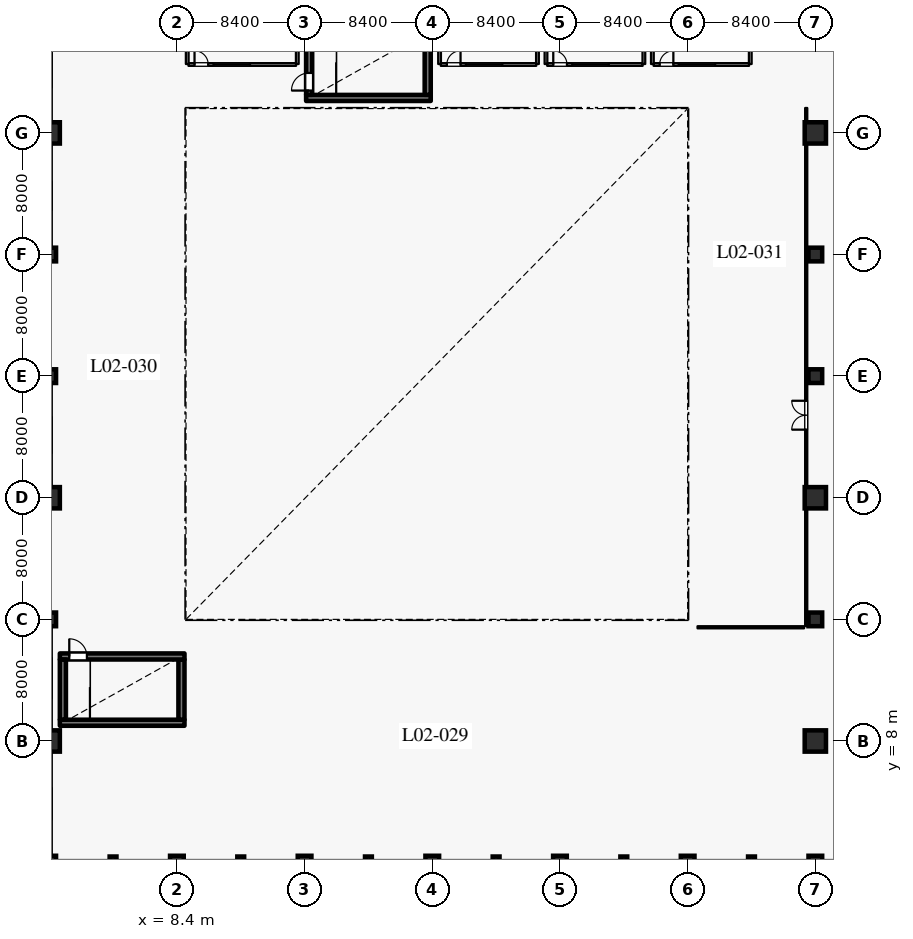
"""IFC4 building model, lengths in metres.
Left out: names, types, materials, properties, quantities, classifications, styles, units other than length and angle.
Written with IfcOpenShell. Run it as: python <this file> out.ifc"""

import sys

from ifc_helpers import new_model, si_unit, direction, frame, frame_2d, origin, origin_with_axes, origin_2d, place, context, subcontext, project, spatial, rectangle, circle, extrude, element, fill, save


model = new_model("IFC4")
c1 = context("Model", 3, precision=1e-05, world=origin(), true_north=direction((0.0, 1.0)))
c2 = subcontext(c1, "Body", "Model", "MODEL_VIEW")
j1 = project(units=[si_unit("LENGTHUNIT", "METRE"), si_unit("PLANEANGLEUNIT", "RADIAN")], contexts=[c1])
p1 = place(None, origin())
s1 = spatial("IfcSite", under=j1, at=p1, CompositionType="ELEMENT")
p2 = place(p1, origin())
s2 = spatial("IfcBuilding", under=s1, at=p2, CompositionType="ELEMENT")
p3 = place(p2, frame((0.0, 0.0, 11.4)))
s3 = spatial("IfcBuildingStorey", under=s2, at=p3, CompositionType="ELEMENT", Elevation=11.4)
p4 = place(p3, origin_with_axes())
e1 = element("IfcColumn", 1, at=p4, inside=s3, PredefinedType="COLUMN", context=c2, shape_type="SweptSolid", body=[
    extrude(rectangle(XDim=0.9, YDim=0.9, at=origin_2d()), origin(), (0.0, 0.0, 1.0), 4.8),
])
p5 = place(p3, frame((0.0, 8.0, 0.0), z_axis=(0.0, 0.0, 1.0), x_axis=(1.0, 0.0, 0.0)))
e2 = element("IfcColumn", 2, at=p5, inside=s3, PredefinedType="COLUMN", context=c2, shape_type="SweptSolid", body=[
    extrude(circle(Radius=0.7, at=origin_2d()), origin(), (0.0, 0.0, 1.0), 4.8),
])
p6 = place(p3, frame((0.0, 16.0, 0.0), z_axis=(0.0, 0.0, 1.0), x_axis=(1.0, 0.0, 0.0)))
e3 = element("IfcColumn", 3, at=p6, inside=s3, PredefinedType="COLUMN", context=c2, shape_type="SweptSolid", body=[
    extrude(rectangle(XDim=0.9, YDim=0.9, at=origin_2d()), origin(), (0.0, 0.0, 1.0), 4.8),
])
p7 = place(p3, frame((0.0, 24.0, 0.0), z_axis=(0.0, 0.0, 1.0), x_axis=(1.0, 0.0, 0.0)))
e4 = element("IfcColumn", 4, at=p7, inside=s3, PredefinedType="COLUMN", context=c2, shape_type="SweptSolid", body=[
    extrude(circle(Radius=0.7, at=origin_2d()), origin(), (0.0, 0.0, 1.0), 4.8),
])
for number, where, z_axis, x_axis in (
    (5, (0.0, 32.0, 0.0), (0.0, 0.0, 1.0), (1.0, 0.0, 0.0)),
    (6, (0.0, 40.0, 0.0), (0.0, 0.0, 1.0), (1.0, 0.0, 0.0)),
):
    element("IfcColumn", number, at=place(p3, frame(where, z_axis=z_axis, x_axis=x_axis)), inside=s3, PredefinedType="COLUMN", context=c2, shape_type="SweptSolid", body=[
        extrude(rectangle(XDim=0.9, YDim=0.9, at=origin_2d()), origin(), (0.0, 0.0, 1.0), 4.8),
    ])
p8 = place(p3, frame((0.0, 48.0, 0.0), z_axis=(0.0, 0.0, 1.0), x_axis=(1.0, 0.0, 0.0)))
e7 = element("IfcColumn", 7, at=p8, inside=s3, PredefinedType="COLUMN", context=c2, shape_type="SweptSolid", body=[
    extrude(circle(Radius=0.7, at=origin_2d()), origin(), (0.0, 0.0, 1.0), 4.8),
])
p9 = place(p3, frame((4.2, 0.0, 0.0), z_axis=(0.0, 0.0, 1.0), x_axis=(1.0, 0.0, 0.0)))
e8 = element("IfcColumn", 8, at=p9, inside=s3, PredefinedType="PILASTER", context=c2, shape_type="SweptSolid", body=[
    extrude(rectangle(XDim=0.45, YDim=0.8, at=origin_2d()), origin(), (0.0, 0.0, 1.0), 4.8),
])
p10 = place(p3, frame((8.4, 0.0, 0.0), z_axis=(0.0, 0.0, 1.0), x_axis=(1.0, 0.0, 0.0)))
e9 = element("IfcColumn", 9, at=p10, inside=s3, PredefinedType="COLUMN", context=c2, shape_type="SweptSolid", body=[
    extrude(rectangle(XDim=0.9, YDim=0.9, at=origin_2d()), origin(), (0.0, 0.0, 1.0), 4.8),
])
p11 = place(p3, frame((12.6, 0.0, 0.0), z_axis=(0.0, 0.0, 1.0), x_axis=(1.0, 0.0, 0.0)))
e10 = element("IfcColumn", 10, at=p11, inside=s3, PredefinedType="PILASTER", context=c2, shape_type="SweptSolid", body=[
    extrude(rectangle(XDim=0.45, YDim=0.8, at=origin_2d()), origin(), (0.0, 0.0, 1.0), 4.8),
])
p12 = place(p3, frame((16.8, 0.0, 0.0), z_axis=(0.0, 0.0, 1.0), x_axis=(1.0, 0.0, 0.0)))
e11 = element("IfcColumn", 11, at=p12, inside=s3, PredefinedType="COLUMN", context=c2, shape_type="SweptSolid", body=[
    extrude(rectangle(XDim=0.9, YDim=0.9, at=origin_2d()), origin(), (0.0, 0.0, 1.0), 4.8),
])
p13 = place(p3, frame((21.0, 0.0, 0.0), z_axis=(0.0, 0.0, 1.0), x_axis=(1.0, 0.0, 0.0)))
e12 = element("IfcColumn", 12, at=p13, inside=s3, PredefinedType="PILASTER", context=c2, shape_type="SweptSolid", body=[
    extrude(rectangle(XDim=0.45, YDim=0.8, at=origin_2d()), origin(), (0.0, 0.0, 1.0), 4.8),
])
p14 = place(p3, frame((25.2, 0.0, 0.0), z_axis=(0.0, 0.0, 1.0), x_axis=(1.0, 0.0, 0.0)))
e13 = element("IfcColumn", 13, at=p14, inside=s3, PredefinedType="COLUMN", context=c2, shape_type="SweptSolid", body=[
    extrude(rectangle(XDim=0.9, YDim=0.9, at=origin_2d()), origin(), (0.0, 0.0, 1.0), 4.8),
])
p15 = place(p3, frame((29.4, 0.0, 0.0), z_axis=(0.0, 0.0, 1.0), x_axis=(1.0, 0.0, 0.0)))
e14 = element("IfcColumn", 14, at=p15, inside=s3, PredefinedType="PILASTER", context=c2, shape_type="SweptSolid", body=[
    extrude(rectangle(XDim=0.45, YDim=0.8, at=origin_2d()), origin(), (0.0, 0.0, 1.0), 4.8),
])
p16 = place(p3, frame((33.6, 0.0, 0.0), z_axis=(0.0, 0.0, 1.0), x_axis=(1.0, 0.0, 0.0)))
e15 = element("IfcColumn", 15, at=p16, inside=s3, PredefinedType="COLUMN", context=c2, shape_type="SweptSolid", body=[
    extrude(rectangle(XDim=0.9, YDim=0.9, at=origin_2d()), origin(), (0.0, 0.0, 1.0), 4.8),
])
p17 = place(p3, frame((37.8, 0.0, 0.0), z_axis=(0.0, 0.0, 1.0), x_axis=(1.0, 0.0, 0.0)))
e16 = element("IfcColumn", 16, at=p17, inside=s3, PredefinedType="PILASTER", context=c2, shape_type="SweptSolid", body=[
    extrude(rectangle(XDim=0.45, YDim=0.8, at=origin_2d()), origin(), (0.0, 0.0, 1.0), 4.8),
])
p18 = place(p3, frame((42.0, 0.0, 0.0), z_axis=(0.0, 0.0, 1.0), x_axis=(1.0, 0.0, 0.0)))
e17 = element("IfcColumn", 17, at=p18, inside=s3, PredefinedType="COLUMN", context=c2, shape_type="SweptSolid", body=[
    extrude(rectangle(XDim=0.9, YDim=0.9, at=origin_2d()), origin(), (0.0, 0.0, 1.0), 4.8),
])
p19 = place(p3, frame((46.2, 0.0, 0.0), z_axis=(0.0, 0.0, 1.0), x_axis=(1.0, 0.0, 0.0)))
e18 = element("IfcColumn", 18, at=p19, inside=s3, PredefinedType="PILASTER", context=c2, shape_type="SweptSolid", body=[
    extrude(rectangle(XDim=0.45, YDim=0.8, at=origin_2d()), origin(), (0.0, 0.0, 1.0), 4.8),
])
p20 = place(p3, frame((50.4, 0.0, 0.0), z_axis=(0.0, 0.0, 1.0), x_axis=(1.0, 0.0, 0.0)))
e19 = element("IfcColumn", 19, at=p20, inside=s3, PredefinedType="COLUMN", context=c2, shape_type="SweptSolid", body=[
    extrude(rectangle(XDim=0.9, YDim=0.9, at=origin_2d()), origin(), (0.0, 0.0, 1.0), 4.8),
])
p21 = place(p3, frame((50.4, 8.0, 0.0), z_axis=(0.0, 0.0, 1.0), x_axis=(1.0, 0.0, 0.0)))
e20 = element("IfcColumn", 20, at=p21, inside=s3, PredefinedType="COLUMN", context=c2, shape_type="SweptSolid", body=[
    extrude(circle(Radius=0.7, at=origin_2d()), origin(), (0.0, 0.0, 1.0), 4.8),
])
p22 = place(p3, frame((50.4, 16.0, 0.0), z_axis=(0.0, 0.0, 1.0), x_axis=(1.0, 0.0, 0.0)))
e21 = element("IfcColumn", 21, at=p22, inside=s3, PredefinedType="COLUMN", context=c2, shape_type="SweptSolid", body=[
    extrude(rectangle(XDim=0.9, YDim=0.9, at=origin_2d()), origin(), (0.0, 0.0, 1.0), 4.8),
])
p23 = place(p3, frame((50.4, 24.0, 0.0), z_axis=(0.0, 0.0, 1.0), x_axis=(1.0, 0.0, 0.0)))
e22 = element("IfcColumn", 22, at=p23, inside=s3, PredefinedType="COLUMN", context=c2, shape_type="SweptSolid", body=[
    extrude(circle(Radius=0.7, at=origin_2d()), origin(), (0.0, 0.0, 1.0), 4.8),
])
for number, where, z_axis, x_axis in (
    (23, (50.4, 32.0, 0.0), (0.0, 0.0, 1.0), (1.0, 0.0, 0.0)),
    (24, (50.4, 40.0, 0.0), (0.0, 0.0, 1.0), (1.0, 0.0, 0.0)),
):
    element("IfcColumn", number, at=place(p3, frame(where, z_axis=z_axis, x_axis=x_axis)), inside=s3, PredefinedType="COLUMN", context=c2, shape_type="SweptSolid", body=[
        extrude(rectangle(XDim=0.9, YDim=0.9, at=origin_2d()), origin(), (0.0, 0.0, 1.0), 4.8),
    ])
p24 = place(p3, frame((50.4, 48.0, 0.0), z_axis=(0.0, 0.0, 1.0), x_axis=(1.0, 0.0, 0.0)))
e25 = element("IfcColumn", 25, at=p24, inside=s3, PredefinedType="COLUMN", context=c2, shape_type="SweptSolid", body=[
    extrude(circle(Radius=0.7, at=origin_2d()), origin(), (0.0, 0.0, 1.0), 4.8),
])
p25 = place(p3, frame((0.7, 9.2, 0.0), z_axis=(0.0, 0.0, 1.0), x_axis=(1.0, 0.0, 0.0)))
e26 = element("IfcWall", 26, at=p25, inside=s3, PredefinedType="SHEAR", context=c2, shape_type="SweptSolid", body=[
    extrude(rectangle(XDim=8.2, YDim=0.4, at=frame_2d((4.1, 0.0))), origin(), (0.0, 0.0, 1.0), 4.535),
])
p26 = place(p3, frame((8.7, 9.405, 0.0), z_axis=(0.0, 0.0, 1.0), x_axis=(0.0, 1.0, 0.0)))
e27 = element("IfcWall", 27, at=p26, inside=s3, PredefinedType="SHEAR", context=c2, shape_type="SweptSolid", body=[
    extrude(rectangle(XDim=3.95, YDim=0.4, at=frame_2d((1.975, 0.0))), origin(), (0.0, 0.0, 1.0), 4.535),
])
p27 = place(p3, frame((0.7, 13.56, 0.0), z_axis=(0.0, 0.0, 1.0), x_axis=(1.0, 0.0, 0.0)))
e28 = element("IfcWall", 28, at=p27, inside=s3, PredefinedType="SHEAR", context=c2, shape_type="SweptSolid", body=[
    extrude(rectangle(XDim=8.2, YDim=0.4, at=frame_2d((4.1, 0.0))), origin(), (0.0, 0.0, 1.0), 4.535),
])
p28 = place(p27, frame((0.62, 0.0, 0.0)))
e29 = element("IfcOpeningElement", 29, at=p28, cuts=e28, PredefinedType="OPENING", context=c2, shape_type="SweptSolid", body=[
    extrude(rectangle(XDim=1.16, YDim=2.2, at=frame_2d((0.58, 1.1))), frame((0.0, 0.21, 0.0), z_axis=(0.0, -1.0, 0.0), x_axis=(1.0, 0.0, 0.0)), (0.0, 0.0, 1.0), 0.42),
])
p29 = place(p3, frame((0.9, 9.405, 0.0), z_axis=(0.0, 0.0, 1.0), x_axis=(0.0, 1.0, 0.0)))
e30 = element("IfcWall", 30, at=p29, inside=s3, PredefinedType="SHEAR", context=c2, shape_type="SweptSolid", body=[
    extrude(rectangle(XDim=3.95, YDim=0.4, at=frame_2d((1.975, 0.0))), origin(), (0.0, 0.0, 1.0), 4.535),
])
p30 = place(p3, frame((16.9, 50.3, 0.0), z_axis=(0.0, 0.0, 1.0), x_axis=(1.0, 0.0, 0.0)))
e31 = element("IfcWall", 31, at=p30, inside=s3, PredefinedType="SHEAR", context=c2, shape_type="SweptSolid", body=[
    extrude(rectangle(XDim=8.2, YDim=0.4, at=frame_2d((4.1, 0.0))), origin(), (0.0, 0.0, 1.0), 4.535),
])
p31 = place(p3, frame((24.9, 50.505, 0.0), z_axis=(0.0, 0.0, 1.0), x_axis=(0.0, 1.0, 0.0)))
e32 = element("IfcWall", 32, at=p31, inside=s3, PredefinedType="SHEAR", context=c2, shape_type="SweptSolid", body=[
    extrude(rectangle(XDim=3.95, YDim=0.4, at=frame_2d((1.975, 0.0))), origin(), (0.0, 0.0, 1.0), 4.535),
])
p32 = place(p3, frame((17.1, 50.505, 0.0), z_axis=(0.0, 0.0, 1.0), x_axis=(0.0, 1.0, 0.0)))
e33 = element("IfcWall", 33, at=p32, inside=s3, PredefinedType="SHEAR", context=c2, shape_type="SweptSolid", body=[
    extrude(rectangle(XDim=3.95, YDim=0.4, at=frame_2d((1.975, 0.0))), origin(), (0.0, 0.0, 1.0), 4.535),
])
p33 = place(p32, frame((0.28, 0.0, 0.0)))
e34 = element("IfcOpeningElement", 34, at=p33, cuts=e33, PredefinedType="OPENING", context=c2, shape_type="SweptSolid", body=[
    extrude(rectangle(XDim=1.16, YDim=2.2, at=frame_2d((0.58, 1.1))), frame((0.0, 0.21, 0.0), z_axis=(0.0, -1.0, 0.0), x_axis=(1.0, 0.0, 0.0)), (0.0, 0.0, 1.0), 0.42),
])
p34 = place(p3, frame((49.8, 15.56, 0.0), z_axis=(0.0, 0.0, 1.0), x_axis=(0.0, 1.0, 0.0)))
e35 = element("IfcWall", 35, at=p34, inside=s3, PredefinedType="PARTITIONING", context=c2, shape_type="SweptSolid", body=[
    extrude(rectangle(XDim=34.08, YDim=0.14, at=frame_2d((17.04, 0.0))), origin(), (0.0, 0.0, 1.0), 4.535),
])
p35 = place(p34, frame((12.92, 0.0, 0.0)))
e36 = element("IfcOpeningElement", 36, at=p35, cuts=e35, PredefinedType="OPENING", context=c2, shape_type="SweptSolid", body=[
    extrude(rectangle(XDim=1.9, YDim=2.4, at=frame_2d((0.95, 1.2))), frame((0.0, 0.08, 0.0), z_axis=(0.0, -1.0, 0.0), x_axis=(1.0, 0.0, 0.0)), (0.0, 0.0, 1.0), 0.16),
])
p36 = place(p3, frame((42.65, 15.48, 0.0), z_axis=(0.0, 0.0, 1.0), x_axis=(1.0, 0.0, 0.0)))
e37 = element("IfcWall", 37, at=p36, inside=s3, PredefinedType="PARTITIONING", context=c2, shape_type="SweptSolid", body=[
    extrude(rectangle(XDim=7.01, YDim=0.14, at=frame_2d((3.505, 0.0))), origin(), (0.0, 0.0, 1.0), 4.535),
])
p37 = place(p3, frame((9.16, 52.5, 0.0), z_axis=(0.0, 0.0, 1.0), x_axis=(1.0, 0.0, 0.0)))
e38 = element("IfcWall", 38, at=p37, inside=s3, PredefinedType="PARTITIONING", context=c2, shape_type="SweptSolid", body=[
    extrude(rectangle(XDim=7.08, YDim=0.18, at=frame_2d((3.54, 0.0))), origin(), (0.0, 0.0, 1.0), 4.535),
])
p38 = place(p37, frame((0.4, 0.0, 0.0)))
e39 = element("IfcOpeningElement", 39, at=p38, cuts=e38, PredefinedType="OPENING", context=c2, shape_type="SweptSolid", body=[
    extrude(rectangle(XDim=0.9, YDim=2.1, at=frame_2d((0.45, 1.05))), frame((0.0, 0.1, 0.0), z_axis=(0.0, -1.0, 0.0), x_axis=(1.0, 0.0, 0.0)), (0.0, 0.0, 1.0), 0.2),
])
p39 = place(p37, frame((1.65, 0.0, 0.9)))
e40 = element("IfcOpeningElement", 40, at=p39, cuts=e38, PredefinedType="OPENING", context=c2, shape_type="SweptSolid", body=[
    extrude(rectangle(XDim=2.4, YDim=1.3, at=frame_2d((1.2, 0.65))), frame((0.0, 0.1, 0.0), z_axis=(0.0, -1.0, 0.0), x_axis=(1.0, 0.0, 0.0)), (0.0, 0.0, 1.0), 0.2),
])
p40 = place(p3, frame((25.76, 52.5, 0.0), z_axis=(0.0, 0.0, 1.0), x_axis=(1.0, 0.0, 0.0)))
e41 = element("IfcWall", 41, at=p40, inside=s3, PredefinedType="PARTITIONING", context=c2, shape_type="SweptSolid", body=[
    extrude(rectangle(XDim=6.28, YDim=0.18, at=frame_2d((3.14, 0.0))), origin(), (0.0, 0.0, 1.0), 4.535),
])
p41 = place(p40, frame((0.4, 0.0, 0.0)))
e42 = element("IfcOpeningElement", 42, at=p41, cuts=e41, PredefinedType="OPENING", context=c2, shape_type="SweptSolid", body=[
    extrude(rectangle(XDim=0.9, YDim=2.1, at=frame_2d((0.45, 1.05))), frame((0.0, 0.1, 0.0), z_axis=(0.0, -1.0, 0.0), x_axis=(1.0, 0.0, 0.0)), (0.0, 0.0, 1.0), 0.2),
])
p42 = place(p40, frame((1.65, 0.0, 0.9)))
e43 = element("IfcOpeningElement", 43, at=p42, cuts=e41, PredefinedType="OPENING", context=c2, shape_type="SweptSolid", body=[
    extrude(rectangle(XDim=2.4, YDim=1.3, at=frame_2d((1.2, 0.65))), frame((0.0, 0.1, 0.0), z_axis=(0.0, -1.0, 0.0), x_axis=(1.0, 0.0, 0.0)), (0.0, 0.0, 1.0), 0.2),
])
p43 = place(p3, frame((32.76, 52.5, 0.0), z_axis=(0.0, 0.0, 1.0), x_axis=(1.0, 0.0, 0.0)))
e44 = element("IfcWall", 44, at=p43, inside=s3, PredefinedType="PARTITIONING", context=c2, shape_type="SweptSolid", body=[
    extrude(rectangle(XDim=6.28, YDim=0.18, at=frame_2d((3.14, 0.0))), origin(), (0.0, 0.0, 1.0), 4.535),
])
p44 = place(p43, frame((0.4, 0.0, 0.0)))
e45 = element("IfcOpeningElement", 45, at=p44, cuts=e44, PredefinedType="OPENING", context=c2, shape_type="SweptSolid", body=[
    extrude(rectangle(XDim=0.9, YDim=2.1, at=frame_2d((0.45, 1.05))), frame((0.0, 0.1, 0.0), z_axis=(0.0, -1.0, 0.0), x_axis=(1.0, 0.0, 0.0)), (0.0, 0.0, 1.0), 0.2),
])
p45 = place(p43, frame((1.65, 0.0, 0.9)))
e46 = element("IfcOpeningElement", 46, at=p45, cuts=e44, PredefinedType="OPENING", context=c2, shape_type="SweptSolid", body=[
    extrude(rectangle(XDim=2.4, YDim=1.3, at=frame_2d((1.2, 0.65))), frame((0.0, 0.1, 0.0), z_axis=(0.0, -1.0, 0.0), x_axis=(1.0, 0.0, 0.0)), (0.0, 0.0, 1.0), 0.2),
])
p46 = place(p3, frame((39.76, 52.5, 0.0), z_axis=(0.0, 0.0, 1.0), x_axis=(1.0, 0.0, 0.0)))
e47 = element("IfcWall", 47, at=p46, inside=s3, PredefinedType="PARTITIONING", context=c2, shape_type="SweptSolid", body=[
    extrude(rectangle(XDim=6.28, YDim=0.18, at=frame_2d((3.14, 0.0))), origin(), (0.0, 0.0, 1.0), 4.535),
])
p47 = place(p46, frame((0.4, 0.0, 0.0)))
e48 = element("IfcOpeningElement", 48, at=p47, cuts=e47, PredefinedType="OPENING", context=c2, shape_type="SweptSolid", body=[
    extrude(rectangle(XDim=0.9, YDim=2.1, at=frame_2d((0.45, 1.05))), frame((0.0, 0.1, 0.0), z_axis=(0.0, -1.0, 0.0), x_axis=(1.0, 0.0, 0.0)), (0.0, 0.0, 1.0), 0.2),
])
p48 = place(p46, frame((1.65, 0.0, 0.9)))
e49 = element("IfcOpeningElement", 49, at=p48, cuts=e47, PredefinedType="OPENING", context=c2, shape_type="SweptSolid", body=[
    extrude(rectangle(XDim=2.4, YDim=1.3, at=frame_2d((1.2, 0.65))), frame((0.0, 0.1, 0.0), z_axis=(0.0, -1.0, 0.0), x_axis=(1.0, 0.0, 0.0)), (0.0, 0.0, 1.0), 0.2),
])
for number, where, z_axis, x_axis in (
    (50, (9.08, 52.532, 0.0), (0.0, 0.0, 1.0), (0.0, 1.0, 0.0)),
    (51, (16.32, 52.532, 0.0), (0.0, 0.0, 1.0), (0.0, 1.0, 0.0)),
    (52, (25.68, 52.532, 0.0), (0.0, 0.0, 1.0), (0.0, 1.0, 0.0)),
    (53, (32.12, 52.532, 0.0), (0.0, 0.0, 1.0), (0.0, 1.0, 0.0)),
    (54, (32.68, 52.532, 0.0), (0.0, 0.0, 1.0), (0.0, 1.0, 0.0)),
    (55, (39.12, 52.532, 0.0), (0.0, 0.0, 1.0), (0.0, 1.0, 0.0)),
    (56, (39.68, 52.532, 0.0), (0.0, 0.0, 1.0), (0.0, 1.0, 0.0)),
    (57, (46.12, 52.532, 0.0), (0.0, 0.0, 1.0), (0.0, 1.0, 0.0)),
):
    element("IfcWall", number, at=place(p3, frame(where, z_axis=z_axis, x_axis=x_axis)), inside=s3, PredefinedType="PARTITIONING", context=c2, shape_type="SweptSolid", body=[
        extrude(rectangle(XDim=2.768, YDim=0.18, at=frame_2d((1.384, 0.0))), origin(), (0.0, 0.0, 1.0), 4.535),
    ])
p49 = place(p28, origin())
e58 = element("IfcDoor", 58, at=p49, inside=s3, OperationType="SINGLE_SWING_LEFT", PredefinedType="DOOR", context=c2, shape_type="SweptSolid", body=[
    extrude(rectangle(XDim=1.16, YDim=2.2, at=frame_2d((0.58, 1.1))), frame((0.0, 0.025, 0.0), z_axis=(0.0, -1.0, 0.0), x_axis=(1.0, 0.0, 0.0)), (0.0, 0.0, 1.0), 0.05),
])
fill(e29, e58)
p50 = place(p33, origin())
e59 = element("IfcDoor", 59, at=p50, inside=s3, OperationType="SINGLE_SWING_LEFT", PredefinedType="DOOR", context=c2, shape_type="SweptSolid", body=[
    extrude(rectangle(XDim=1.16, YDim=2.2, at=frame_2d((0.58, 1.1))), frame((0.0, 0.025, 0.0), z_axis=(0.0, -1.0, 0.0), x_axis=(1.0, 0.0, 0.0)), (0.0, 0.0, 1.0), 0.05),
])
fill(e34, e59)
p51 = place(p35, origin())
e60 = element("IfcDoor", 60, at=p51, inside=s3, OperationType="DOUBLE_DOOR_SINGLE_SWING", PredefinedType="DOOR", context=c2, shape_type="SweptSolid", body=[
    extrude(rectangle(XDim=1.9, YDim=2.4, at=frame_2d((0.95, 1.2))), frame((0.0, 0.025, 0.0), z_axis=(0.0, -1.0, 0.0), x_axis=(1.0, 0.0, 0.0)), (0.0, 0.0, 1.0), 0.05),
])
fill(e36, e60)
p52 = place(p38, origin())
e61 = element("IfcDoor", 61, at=p52, inside=s3, OperationType="SINGLE_SWING_LEFT", PredefinedType="DOOR", context=c2, shape_type="SweptSolid", body=[
    extrude(rectangle(XDim=0.9, YDim=2.1, at=frame_2d((0.45, 1.05))), frame((0.0, 0.025, 0.0), z_axis=(0.0, -1.0, 0.0), x_axis=(1.0, 0.0, 0.0)), (0.0, 0.0, 1.0), 0.05),
])
fill(e39, e61)
p53 = place(p39, origin())
e62 = element("IfcWindow", 62, at=p53, inside=s3, PartitioningType="DOUBLE_PANEL_VERTICAL", PredefinedType="WINDOW", context=c2, shape_type="SweptSolid", body=[
    extrude(rectangle(XDim=2.4, YDim=1.3, at=frame_2d((1.2, 0.65))), frame((0.0, 0.03, 0.0), z_axis=(0.0, -1.0, 0.0), x_axis=(1.0, 0.0, 0.0)), (0.0, 0.0, 1.0), 0.06),
])
fill(e40, e62)
p54 = place(p41, origin())
e63 = element("IfcDoor", 63, at=p54, inside=s3, OperationType="SINGLE_SWING_RIGHT", PredefinedType="DOOR", context=c2, shape_type="SweptSolid", body=[
    extrude(rectangle(XDim=0.9, YDim=2.1, at=frame_2d((0.45, 1.05))), frame((0.0, 0.025, 0.0), z_axis=(0.0, -1.0, 0.0), x_axis=(1.0, 0.0, 0.0)), (0.0, 0.0, 1.0), 0.05),
])
fill(e42, e63)
p55 = place(p42, origin())
e64 = element("IfcWindow", 64, at=p55, inside=s3, PartitioningType="DOUBLE_PANEL_VERTICAL", PredefinedType="WINDOW", context=c2, shape_type="SweptSolid", body=[
    extrude(rectangle(XDim=2.4, YDim=1.3, at=frame_2d((1.2, 0.65))), frame((0.0, 0.03, 0.0), z_axis=(0.0, -1.0, 0.0), x_axis=(1.0, 0.0, 0.0)), (0.0, 0.0, 1.0), 0.06),
])
fill(e43, e64)
p56 = place(p44, origin())
e65 = element("IfcDoor", 65, at=p56, inside=s3, OperationType="SINGLE_SWING_LEFT", PredefinedType="DOOR", context=c2, shape_type="SweptSolid", body=[
    extrude(rectangle(XDim=0.9, YDim=2.1, at=frame_2d((0.45, 1.05))), frame((0.0, 0.025, 0.0), z_axis=(0.0, -1.0, 0.0), x_axis=(1.0, 0.0, 0.0)), (0.0, 0.0, 1.0), 0.05),
])
fill(e45, e65)
p57 = place(p45, origin())
e66 = element("IfcWindow", 66, at=p57, inside=s3, PartitioningType="DOUBLE_PANEL_VERTICAL", PredefinedType="WINDOW", context=c2, shape_type="SweptSolid", body=[
    extrude(rectangle(XDim=2.4, YDim=1.3, at=frame_2d((1.2, 0.65))), frame((0.0, 0.03, 0.0), z_axis=(0.0, -1.0, 0.0), x_axis=(1.0, 0.0, 0.0)), (0.0, 0.0, 1.0), 0.06),
])
fill(e46, e66)
p58 = place(p47, origin())
e67 = element("IfcDoor", 67, at=p58, inside=s3, OperationType="SINGLE_SWING_RIGHT", PredefinedType="DOOR", context=c2, shape_type="SweptSolid", body=[
    extrude(rectangle(XDim=0.9, YDim=2.1, at=frame_2d((0.45, 1.05))), frame((0.0, 0.025, 0.0), z_axis=(0.0, -1.0, 0.0), x_axis=(1.0, 0.0, 0.0)), (0.0, 0.0, 1.0), 0.05),
])
fill(e48, e67)
p59 = place(p48, origin())
e68 = element("IfcWindow", 68, at=p59, inside=s3, PartitioningType="DOUBLE_PANEL_VERTICAL", PredefinedType="WINDOW", context=c2, shape_type="SweptSolid", body=[
    extrude(rectangle(XDim=2.4, YDim=1.3, at=frame_2d((1.2, 0.65))), frame((0.0, 0.03, 0.0), z_axis=(0.0, -1.0, 0.0), x_axis=(1.0, 0.0, 0.0)), (0.0, 0.0, 1.0), 0.06),
])
fill(e49, e68)
save(model, sys.argv[1])
